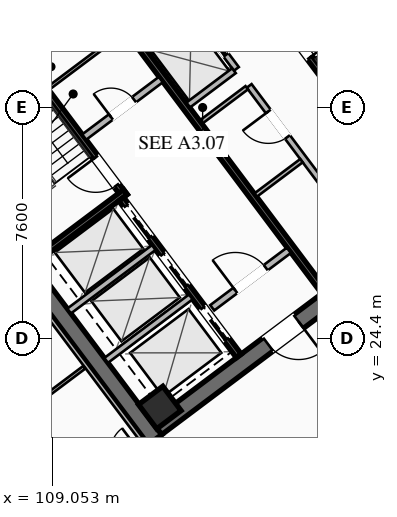
"""IFC4 building model, lengths in metres.
Left out: names, types, materials, properties, quantities, classifications, styles, units other than length and angle.
Written with IfcOpenShell. Run it as: python <this file> out.ifc"""

import sys

from ifc_helpers import new_model, si_unit, direction, frame, frame_2d, origin, origin_2d, place, context, subcontext, project, spatial, rectangle, hollow_rectangle, extrude, element, fill, save


model = new_model("IFC4")
c1 = context("Model", 3, precision=1e-05, world=origin(), true_north=direction((0.0, 1.0)))
c2 = subcontext(c1, "Body", "Model", "MODEL_VIEW")
j1 = project(units=[si_unit("LENGTHUNIT", "METRE"), si_unit("PLANEANGLEUNIT", "RADIAN")], contexts=[c1])
p1 = place(None, origin())
s1 = spatial("IfcSite", under=j1, at=p1, CompositionType="ELEMENT")
p2 = place(p1, origin())
s2 = spatial("IfcBuilding", under=s1, at=p2, CompositionType="ELEMENT")
p3 = place(p2, frame((0.0, 0.0, 114.4)))
s3 = spatial("IfcBuildingStorey", under=s2, at=p3, CompositionType="ELEMENT", Elevation=114.4)
for number, where, z_axis, x_axis in (
    (1, (112.436, 21.077, 0.0), (0.0, 0.0, 1.0), (-0.6, 0.8, 0.0)),
    (2, (115.564, 42.923, 0.0), (0.0, 0.0, 1.0), (0.6, -0.8, 0.0)),
):
    element("IfcWall", number, at=place(p3, frame(where, z_axis=z_axis, x_axis=x_axis)), inside=s3, PredefinedType="SHEAR", context=c2, shape_type="SweptSolid", body=[
        extrude(rectangle(XDim=15.6, YDim=0.55, at=frame_2d((7.8, 0.0))), origin(), (0.0, 0.0, 1.0), 3.55),
    ])
p4 = place(p3, frame((124.539, 30.498, 0.0), z_axis=(0.0, 0.0, 1.0), x_axis=(-0.799998054672, -0.600002593761, 0.0)))
e3 = element("IfcWall", 3, at=p4, inside=s3, PredefinedType="SHEAR", context=c2, shape_type="SweptSolid", body=[
    extrude(rectangle(XDim=15.06, YDim=0.55, at=frame_2d((7.53, 0.0))), origin(), (0.0, 0.0, 1.0), 3.55),
])
p5 = place(p4, frame((9.23, 0.0, 0.0)))
e4 = element("IfcOpeningElement", 4, at=p5, cuts=e3, PredefinedType="OPENING", context=c2, shape_type="SweptSolid", body=[
    extrude(rectangle(XDim=1.25, YDim=2.25, at=frame_2d((0.625, 1.125))), frame((0.0, 0.285, 0.0), z_axis=(0.0, -1.0, 0.0), x_axis=(1.0, 0.0, 0.0)), (0.0, 0.0, 1.0), 0.57),
])
p6 = place(p4, frame((4.18, 0.0, 0.0)))
e5 = element("IfcOpeningElement", 5, at=p6, cuts=e3, PredefinedType="OPENING", context=c2, shape_type="SweptSolid", body=[
    extrude(rectangle(XDim=1.25, YDim=2.25, at=frame_2d((0.625, 1.125))), frame((0.0, 0.285, 0.0), z_axis=(0.0, -1.0, 0.0), x_axis=(1.0, 0.0, 0.0)), (0.0, 0.0, 1.0), 0.57),
])
p7 = place(p3, frame((103.461, 33.502, 0.0), z_axis=(0.0, 0.0, 1.0), x_axis=(0.799998054672, 0.600002593761, 0.0)))
e6 = element("IfcWall", 6, at=p7, inside=s3, PredefinedType="SHEAR", context=c2, shape_type="SweptSolid", body=[
    extrude(rectangle(XDim=15.06, YDim=0.55, at=frame_2d((7.53, 0.0))), origin(), (0.0, 0.0, 1.0), 3.55),
])
p8 = place(p7, frame((4.58, 0.0, 0.0)))
e7 = element("IfcOpeningElement", 7, at=p8, cuts=e6, PredefinedType="OPENING", context=c2, shape_type="SweptSolid", body=[
    extrude(rectangle(XDim=1.25, YDim=2.25, at=frame_2d((0.625, 1.125))), frame((0.0, 0.285, 0.0), z_axis=(0.0, -1.0, 0.0), x_axis=(1.0, 0.0, 0.0)), (0.0, 0.0, 1.0), 0.57),
])
p9 = place(p7, frame((9.63, 0.0, 0.0)))
e8 = element("IfcOpeningElement", 8, at=p9, cuts=e6, PredefinedType="OPENING", context=c2, shape_type="SweptSolid", body=[
    extrude(rectangle(XDim=1.25, YDim=2.25, at=frame_2d((0.625, 1.125))), frame((0.0, 0.285, 0.0), z_axis=(0.0, -1.0, 0.0), x_axis=(1.0, 0.0, 0.0)), (0.0, 0.0, 1.0), 0.57),
])
p10 = place(p3, frame((112.59, 22.13, 0.0), z_axis=(0.0, 0.0, 1.0), x_axis=(0.799999996291, 0.600000004945, 0.0)))
e9 = element("IfcColumn", 9, at=p10, inside=s3, PredefinedType="COLUMN", context=c2, shape_type="SweptSolid", body=[
    extrude(hollow_rectangle(XDim=1.0, YDim=1.0, WallThickness=0.04, at=origin_2d()), origin(), (0.0, 0.0, 1.0), 3.37),
])
p11 = place(p3, frame((111.44, 29.08, 0.0), z_axis=(0.0, 0.0, 1.0), x_axis=(-0.59999029481, 0.8000072788, 0.0)))
e10 = element("IfcWall", 10, at=p11, inside=s3, PredefinedType="SHEAR", context=c2, shape_type="SweptSolid", body=[
    extrude(rectangle(XDim=8.05, YDim=0.2, at=frame_2d((4.025, 0.0))), origin(), (0.0, 0.0, 1.0), 3.37),
])
p12 = place(p11, frame((0.45, 0.0, 0.0)))
e11 = element("IfcOpeningElement", 11, at=p12, cuts=e10, PredefinedType="OPENING", context=c2, shape_type="SweptSolid", body=[
    extrude(rectangle(XDim=1.15, YDim=2.2, at=frame_2d((0.575, 1.1))), frame((0.0, 0.11, 0.0), z_axis=(0.0, -1.0, 0.0), x_axis=(1.0, 0.0, 0.0)), (0.0, 0.0, 1.0), 0.22),
])
p13 = place(p3, frame((108.396, 26.922, 0.0), z_axis=(0.0, 0.0, 1.0), x_axis=(0.800015298837, 0.599979601008, 0.0)))
e12 = element("IfcWall", 12, at=p13, inside=s3, PredefinedType="SHEAR", context=c2, shape_type="SweptSolid", body=[
    extrude(rectangle(XDim=3.83, YDim=0.2, at=frame_2d((1.915, 0.0))), origin(), (0.0, 0.0, 1.0), 3.37),
])
p14 = place(p3, frame((116.56, 34.92, 0.0), z_axis=(0.0, 0.0, 1.0), x_axis=(0.59999029481, -0.8000072788, 0.0)))
e13 = element("IfcWall", 13, at=p14, inside=s3, PredefinedType="SHEAR", context=c2, shape_type="SweptSolid", body=[
    extrude(rectangle(XDim=8.05, YDim=0.2, at=frame_2d((4.025, 0.0))), origin(), (0.0, 0.0, 1.0), 3.37),
])
p15 = place(p14, frame((0.45, 0.0, 0.0)))
e14 = element("IfcOpeningElement", 14, at=p15, cuts=e13, PredefinedType="OPENING", context=c2, shape_type="SweptSolid", body=[
    extrude(rectangle(XDim=1.15, YDim=2.2, at=frame_2d((0.575, 1.1))), frame((0.0, 0.11, 0.0), z_axis=(0.0, -1.0, 0.0), x_axis=(1.0, 0.0, 0.0)), (0.0, 0.0, 1.0), 0.22),
])
p16 = place(p3, frame((117.998, 25.936, 0.0), z_axis=(0.0, 0.0, 1.0), x_axis=(-0.600002693989, 0.799997979501, 0.0)))
e15 = element("IfcWall", 15, at=p16, inside=s3, PredefinedType="SHEAR", context=c2, shape_type="SweptSolid", body=[
    extrude(rectangle(XDim=14.5, YDim=0.2, at=frame_2d((7.25, 0.0))), origin(), (0.0, 0.0, 1.0), 3.37),
])
p17 = place(p3, frame((110.104, 31.028, 0.0), z_axis=(0.0, 0.0, 1.0), x_axis=(0.800018601094, 0.59997519774, 0.0)))
e16 = element("IfcWall", 16, at=p17, inside=s3, PredefinedType="SOLIDWALL", context=c2, shape_type="SweptSolid", body=[
    extrude(rectangle(XDim=3.15, YDim=0.22, at=frame_2d((1.575, 0.0))), origin(), (0.0, 0.0, 1.0), 2.723),
])
p18 = place(p17, frame((1.1, 0.0, 0.0)))
e17 = element("IfcOpeningElement", 17, at=p18, cuts=e16, PredefinedType="OPENING", context=c2, shape_type="SweptSolid", body=[
    extrude(rectangle(XDim=0.95, YDim=2.05, at=frame_2d((0.475, 1.025))), frame((0.0, 0.12, 0.0), z_axis=(0.0, -1.0, 0.0), x_axis=(1.0, 0.0, 0.0)), (0.0, 0.0, 1.0), 0.24),
])
p19 = place(p3, frame((114.316, 25.412, 0.0), z_axis=(0.0, 0.0, 1.0), x_axis=(0.800018601094, 0.59997519774, 0.0)))
e18 = element("IfcWall", 18, at=p19, inside=s3, PredefinedType="SOLIDWALL", context=c2, shape_type="SweptSolid", body=[
    extrude(rectangle(XDim=3.15, YDim=0.22, at=frame_2d((1.575, 0.0))), origin(), (0.0, 0.0, 1.0), 2.723),
])
p20 = place(p19, frame((0.95, 0.0, 0.0)))
e19 = element("IfcOpeningElement", 19, at=p20, cuts=e18, PredefinedType="OPENING", context=c2, shape_type="SweptSolid", body=[
    extrude(rectangle(XDim=1.25, YDim=2.25, at=frame_2d((0.625, 1.125))), frame((0.0, 0.12, 0.0), z_axis=(0.0, -1.0, 0.0), x_axis=(1.0, 0.0, 0.0)), (0.0, 0.0, 1.0), 0.24),
])
p21 = place(p3, frame((115.19, 23.83, 0.0), z_axis=(0.0, 0.0, 1.0), x_axis=(-0.599993943644, 0.800004542231, 0.0)))
e20 = element("IfcWall", 20, at=p21, inside=s3, PredefinedType="SHEAR", context=c2, shape_type="SweptSolid", body=[
    extrude(rectangle(XDim=6.45, YDim=0.2, at=frame_2d((3.225, 0.0))), origin(), (0.0, 0.0, 1.0), 3.37),
])
p22 = place(p21, frame((4.875, 0.0, 0.0)))
e21 = element("IfcOpeningElement", 21, at=p22, cuts=e20, PredefinedType="OPENING", context=c2, shape_type="SweptSolid", body=[
    extrude(rectangle(XDim=1.3, YDim=2.25, at=frame_2d((0.65, 1.125))), frame((0.0, 0.11, 0.0), z_axis=(0.0, -1.0, 0.0), x_axis=(1.0, 0.0, 0.0)), (0.0, 0.0, 1.0), 0.22),
])
p23 = place(p21, frame((2.875, 0.0, 0.0)))
e22 = element("IfcOpeningElement", 22, at=p23, cuts=e20, PredefinedType="OPENING", context=c2, shape_type="SweptSolid", body=[
    extrude(rectangle(XDim=1.3, YDim=2.25, at=frame_2d((0.65, 1.125))), frame((0.0, 0.11, 0.0), z_axis=(0.0, -1.0, 0.0), x_axis=(1.0, 0.0, 0.0)), (0.0, 0.0, 1.0), 0.22),
])
p24 = place(p21, frame((0.675, 0.0, 0.0)))
e23 = element("IfcOpeningElement", 23, at=p24, cuts=e20, PredefinedType="OPENING", context=c2, shape_type="SweptSolid", body=[
    extrude(rectangle(XDim=1.3, YDim=2.25, at=frame_2d((0.65, 1.125))), frame((0.0, 0.11, 0.0), z_axis=(0.0, -1.0, 0.0), x_axis=(1.0, 0.0, 0.0)), (0.0, 0.0, 1.0), 0.22),
])
for number, where, z_axis, x_axis in (
    (24, (110.826, 23.682, 0.0), (0.0, 0.0, 1.0), (0.8, 0.6, 0.0)),
    (25, (109.608, 25.306, 0.0), (0.0, 0.0, 1.0), (0.8, 0.6, 0.0)),
):
    element("IfcWall", number, at=place(p3, frame(where, z_axis=z_axis, x_axis=x_axis)), inside=s3, PredefinedType="SOLIDWALL", context=c2, shape_type="SweptSolid", body=[
        extrude(rectangle(XDim=3.48, YDim=0.2, at=frame_2d((1.74, 0.0))), origin(), (0.0, 0.0, 1.0), 3.37),
    ])
p25 = place(p3, frame((108.91, 32.62, 0.0), z_axis=(0.0, 0.0, 1.0), x_axis=(0.800018601094, 0.59997519774, 0.0)))
e26 = element("IfcWall", 26, at=p25, inside=s3, PredefinedType="PARTITIONING", context=c2, shape_type="SweptSolid", body=[
    extrude(rectangle(XDim=3.15, YDim=0.11, at=frame_2d((1.575, 0.0))), origin(), (0.0, 0.0, 1.0), 2.723),
])
p26 = place(p3, frame((119.67, 27.19, 0.0), z_axis=(0.0, 0.0, 1.0), x_axis=(-0.599988677396, 0.800008491828, 0.0)))
e27 = element("IfcWall", 27, at=p26, inside=s3, PredefinedType="SOLIDWALL", context=c2, shape_type="SweptSolid", body=[
    extrude(rectangle(XDim=6.9, YDim=0.2, at=frame_2d((3.45, 0.0))), origin(), (0.0, 0.0, 1.0), 2.723),
])
p27 = place(p26, frame((0.85, 0.0, 0.0)))
e28 = element("IfcOpeningElement", 28, at=p27, cuts=e27, PredefinedType="OPENING", context=c2, shape_type="SweptSolid", body=[
    extrude(rectangle(XDim=0.95, YDim=2.05, at=frame_2d((0.475, 1.025))), frame((0.0, 0.11, 0.0), z_axis=(0.0, -1.0, 0.0), x_axis=(1.0, 0.0, 0.0)), (0.0, 0.0, 1.0), 0.22),
])
p28 = place(p26, frame((4.8, 0.0, 0.0)))
e29 = element("IfcOpeningElement", 29, at=p28, cuts=e27, PredefinedType="OPENING", context=c2, shape_type="SweptSolid", body=[
    extrude(rectangle(XDim=1.05, YDim=2.2, at=frame_2d((0.525, 1.1))), frame((0.0, 0.11, 0.0), z_axis=(0.0, -1.0, 0.0), x_axis=(1.0, 0.0, 0.0)), (0.0, 0.0, 1.0), 0.22),
])
for number, where, z_axis, x_axis in (
    (30, (113.946, 31.522, 0.0), (0.0, 0.0, 1.0), (0.8, 0.6, 0.0)),
    (31, (115.746, 29.122, 0.0), (0.0, 0.0, 1.0), (0.8, 0.6, 0.0)),
):
    element("IfcWall", number, at=place(p3, frame(where, z_axis=z_axis, x_axis=x_axis)), inside=s3, PredefinedType="PARTITIONING", context=c2, shape_type="SweptSolid", body=[
        extrude(rectangle(XDim=1.88, YDim=0.135, at=frame_2d((0.94, 0.0))), origin(), (0.0, 0.0, 1.0), 2.723),
    ])
p29 = place(p3, frame((115.11, 33.27, 0.0), z_axis=(0.0, 0.0, 1.0), x_axis=(-0.600011322243, 0.799991508192, 0.0)))
e32 = element("IfcWall", 32, at=p29, inside=s3, PredefinedType="SOLIDWALL", context=c2, shape_type="SweptSolid", body=[
    extrude(rectangle(XDim=6.9, YDim=0.2, at=frame_2d((3.45, 0.0))), origin(), (0.0, 0.0, 1.0), 3.37),
])
p30 = place(p29, frame((0.575, 0.0, 0.0)))
e33 = element("IfcOpeningElement", 33, at=p30, cuts=e32, PredefinedType="OPENING", context=c2, shape_type="SweptSolid", body=[
    extrude(rectangle(XDim=1.1, YDim=2.2, at=frame_2d((0.55, 1.1))), frame((0.0, 0.11, 0.0), z_axis=(0.0, -1.0, 0.0), x_axis=(1.0, 0.0, 0.0)), (0.0, 0.0, 1.0), 0.22),
])
p31 = place(p29, frame((2.825, 0.0, 0.0)))
e34 = element("IfcOpeningElement", 34, at=p31, cuts=e32, PredefinedType="OPENING", context=c2, shape_type="SweptSolid", body=[
    extrude(rectangle(XDim=1.1, YDim=2.2, at=frame_2d((0.55, 1.1))), frame((0.0, 0.11, 0.0), z_axis=(0.0, -1.0, 0.0), x_axis=(1.0, 0.0, 0.0)), (0.0, 0.0, 1.0), 0.22),
])
p32 = place(p29, frame((5.075, 0.0, 0.0)))
e35 = element("IfcOpeningElement", 35, at=p32, cuts=e32, PredefinedType="OPENING", context=c2, shape_type="SweptSolid", body=[
    extrude(rectangle(XDim=1.1, YDim=2.2, at=frame_2d((0.55, 1.1))), frame((0.0, 0.11, 0.0), z_axis=(0.0, -1.0, 0.0), x_axis=(1.0, 0.0, 0.0)), (0.0, 0.0, 1.0), 0.22),
])
p33 = place(p3, frame((113.526, 32.082, 0.0), z_axis=(0.0, 0.0, 1.0), x_axis=(0.800046745961, 0.599937666993, 0.0)))
e36 = element("IfcWall", 36, at=p33, inside=s3, PredefinedType="SOLIDWALL", context=c2, shape_type="SweptSolid", body=[
    extrude(rectangle(XDim=1.88, YDim=0.2, at=frame_2d((0.94, 0.0))), origin(), (0.0, 0.0, 1.0), 3.37),
])
p34 = place(p3, frame((112.176, 33.882, 0.0), z_axis=(0.0, 0.0, 1.0), x_axis=(0.8, 0.6, 0.0)))
e37 = element("IfcWall", 37, at=p34, inside=s3, PredefinedType="SOLIDWALL", context=c2, shape_type="SweptSolid", body=[
    extrude(rectangle(XDim=1.88, YDim=0.2, at=frame_2d((0.94, 0.0))), origin(), (0.0, 0.0, 1.0), 3.37),
])
p35 = place(p3, frame((95.87, 30.09, 0.0), z_axis=(0.0, 0.0, 1.0), x_axis=(0.799997191971, 0.600003744021, 0.0)))
e38 = element("IfcWall", 38, at=p35, inside=s3, PredefinedType="PARTITIONING", context=c2, shape_type="SweptSolid", body=[
    extrude(rectangle(XDim=31.3, YDim=0.135, at=frame_2d((15.65, 0.0))), origin(), (0.0, 0.0, 1.0), 2.723),
])
p36 = place(p35, frame((0.3, 0.0, 0.0)))
e39 = element("IfcOpeningElement", 39, at=p36, cuts=e38, PredefinedType="OPENING", context=c2, shape_type="SweptSolid", body=[
    extrude(rectangle(XDim=0.95, YDim=2.05, at=frame_2d((0.475, 1.025))), frame((0.0, 0.077, 0.0), z_axis=(0.0, -1.0, 0.0), x_axis=(1.0, 0.0, 0.0)), (0.0, 0.0, 1.0), 0.155),
])
p37 = place(p35, frame((30.05, 0.0, 0.0)))
e40 = element("IfcOpeningElement", 40, at=p37, cuts=e38, PredefinedType="OPENING", context=c2, shape_type="SweptSolid", body=[
    extrude(rectangle(XDim=0.95, YDim=2.05, at=frame_2d((0.475, 1.025))), frame((0.0, 0.077, 0.0), z_axis=(0.0, -1.0, 0.0), x_axis=(1.0, 0.0, 0.0)), (0.0, 0.0, 1.0), 0.155),
])
p38 = place(p3, frame((133.282, 32.374, 0.0), z_axis=(0.0, 0.0, 1.0), x_axis=(-0.8, -0.6, 0.0)))
e41 = element("IfcWall", 41, at=p38, inside=s3, PredefinedType="PARTITIONING", context=c2, shape_type="SweptSolid", body=[
    extrude(rectangle(XDim=31.3, YDim=0.135, at=frame_2d((15.65, 0.0))), origin(), (0.0, 0.0, 1.0), 2.723),
])
p39 = place(p38, frame((29.97, 0.0, 0.0)))
e42 = element("IfcOpeningElement", 42, at=p39, cuts=e41, PredefinedType="OPENING", context=c2, shape_type="SweptSolid", body=[
    extrude(rectangle(XDim=0.95, YDim=2.05, at=frame_2d((0.475, 1.025))), frame((0.0, 0.077, 0.0), z_axis=(0.0, -1.0, 0.0), x_axis=(1.0, 0.0, 0.0)), (0.0, 0.0, 1.0), 0.155),
])
p40 = place(p38, frame((19.151, 0.0, 0.0)))
e43 = element("IfcOpeningElement", 43, at=p40, cuts=e41, PredefinedType="OPENING", context=c2, shape_type="SweptSolid", body=[
    extrude(rectangle(XDim=0.95, YDim=2.05, at=frame_2d((0.475, 1.025))), frame((0.0, 0.077, 0.0), z_axis=(0.0, -1.0, 0.0), x_axis=(1.0, 0.0, 0.0)), (0.0, 0.0, 1.0), 0.155),
])
p41 = place(p38, frame((14.901, 0.0, 0.0)))
e44 = element("IfcOpeningElement", 44, at=p41, cuts=e41, PredefinedType="OPENING", context=c2, shape_type="SweptSolid", body=[
    extrude(rectangle(XDim=0.95, YDim=2.05, at=frame_2d((0.475, 1.025))), frame((0.0, 0.077, 0.0), z_axis=(0.0, -1.0, 0.0), x_axis=(1.0, 0.0, 0.0)), (0.0, 0.0, 1.0), 0.155),
])
p42 = place(p38, frame((10.92, 0.0, 0.0)))
e45 = element("IfcOpeningElement", 45, at=p42, cuts=e41, PredefinedType="OPENING", context=c2, shape_type="SweptSolid", body=[
    extrude(rectangle(XDim=0.95, YDim=2.05, at=frame_2d((0.475, 1.025))), frame((0.0, 0.077, 0.0), z_axis=(0.0, -1.0, 0.0), x_axis=(1.0, 0.0, 0.0)), (0.0, 0.0, 1.0), 0.155),
])
p43 = place(p38, frame((0.38, 0.0, 0.0)))
e46 = element("IfcOpeningElement", 46, at=p43, cuts=e41, PredefinedType="OPENING", context=c2, shape_type="SweptSolid", body=[
    extrude(rectangle(XDim=0.95, YDim=2.05, at=frame_2d((0.475, 1.025))), frame((0.0, 0.077, 0.0), z_axis=(0.0, -1.0, 0.0), x_axis=(1.0, 0.0, 0.0)), (0.0, 0.0, 1.0), 0.155),
])
p44 = place(p3, frame((112.104, 20.928, 0.0), z_axis=(0.0, 0.0, 1.0), x_axis=(-0.599994940075, 0.800003794918, 0.0)))
e47 = element("IfcWall", 47, at=p44, inside=s3, PredefinedType="PARTITIONING", context=c2, shape_type="SweptSolid", body=[
    extrude(rectangle(XDim=15.44, YDim=0.135, at=frame_2d((7.72, 0.0))), origin(), (0.0, 0.0, 1.0), 2.723),
])
p45 = place(p3, frame((102.076, 17.432, 0.0), z_axis=(0.0, 0.0, 1.0), x_axis=(0.799991245945, 0.600011671896, 0.0)))
e48 = element("IfcWall", 48, at=p45, inside=s3, PredefinedType="PARTITIONING", context=c2, shape_type="SweptSolid", body=[
    extrude(rectangle(XDim=10.04, YDim=0.11, at=frame_2d((5.02, 0.0))), origin(), (0.0, 0.0, 1.0), 2.723),
])
p46 = place(p5, origin())
e49 = element("IfcDoor", 49, at=p46, inside=s3, OperationType="SINGLE_SWING_LEFT", PredefinedType="DOOR", context=c2, shape_type="SweptSolid", body=[
    extrude(rectangle(XDim=1.25, YDim=2.25, at=frame_2d((0.625, 1.125))), frame((0.0, 0.025, 0.0), z_axis=(0.0, -1.0, 0.0), x_axis=(1.0, 0.0, 0.0)), (0.0, 0.0, 1.0), 0.05),
])
fill(e4, e49)
p47 = place(p12, origin())
e50 = element("IfcDoor", 50, at=p47, inside=s3, OperationType="SINGLE_SWING_RIGHT", PredefinedType="DOOR", context=c2, shape_type="SweptSolid", body=[
    extrude(rectangle(XDim=1.15, YDim=2.2, at=frame_2d((0.575, 1.1))), frame((0.0, 0.025, 0.0), z_axis=(0.0, -1.0, 0.0), x_axis=(1.0, 0.0, 0.0)), (0.0, 0.0, 1.0), 0.05),
])
fill(e11, e50)
p48 = place(p15, origin())
e51 = element("IfcDoor", 51, at=p48, inside=s3, OperationType="SINGLE_SWING_RIGHT", PredefinedType="DOOR", context=c2, shape_type="SweptSolid", body=[
    extrude(rectangle(XDim=1.15, YDim=2.2, at=frame_2d((0.575, 1.1))), frame((0.0, 0.025, 0.0), z_axis=(0.0, -1.0, 0.0), x_axis=(1.0, 0.0, 0.0)), (0.0, 0.0, 1.0), 0.05),
])
fill(e14, e51)
p49 = place(p20, origin())
e52 = element("IfcDoor", 52, at=p49, inside=s3, OperationType="SINGLE_SWING_LEFT", PredefinedType="DOOR", context=c2, shape_type="SweptSolid", body=[
    extrude(rectangle(XDim=1.25, YDim=2.25, at=frame_2d((0.625, 1.125))), frame((0.0, 0.025, 0.0), z_axis=(0.0, -1.0, 0.0), x_axis=(1.0, 0.0, 0.0)), (0.0, 0.0, 1.0), 0.05),
])
fill(e19, e52)
p50 = place(p18, origin())
e53 = element("IfcDoor", 53, at=p50, inside=s3, OperationType="SINGLE_SWING_LEFT", PredefinedType="DOOR", context=c2, shape_type="SweptSolid", body=[
    extrude(rectangle(XDim=0.95, YDim=2.05, at=frame_2d((0.475, 1.025))), frame((0.0, 0.025, 0.0), z_axis=(0.0, -1.0, 0.0), x_axis=(1.0, 0.0, 0.0)), (0.0, 0.0, 1.0), 0.05),
])
fill(e17, e53)
p51 = place(p28, origin())
e54 = element("IfcDoor", 54, at=p51, inside=s3, OperationType="SINGLE_SWING_RIGHT", PredefinedType="DOOR", context=c2, shape_type="SweptSolid", body=[
    extrude(rectangle(XDim=1.05, YDim=2.2, at=frame_2d((0.525, 1.1))), frame((0.0, 0.025, 0.0), z_axis=(0.0, -1.0, 0.0), x_axis=(1.0, 0.0, 0.0)), (0.0, 0.0, 1.0), 0.05),
])
fill(e29, e54)
p52 = place(p22, origin())
e55 = element("IfcDoor", 55, at=p52, inside=s3, OperationType="SLIDING_TO_LEFT", PredefinedType="DOOR", context=c2, shape_type="SweptSolid", body=[
    extrude(rectangle(XDim=1.3, YDim=2.25, at=frame_2d((0.65, 1.125))), frame((0.0, 0.025, 0.0), z_axis=(0.0, -1.0, 0.0), x_axis=(1.0, 0.0, 0.0)), (0.0, 0.0, 1.0), 0.05),
])
fill(e21, e55)
p53 = place(p23, origin())
e56 = element("IfcDoor", 56, at=p53, inside=s3, OperationType="SLIDING_TO_LEFT", PredefinedType="DOOR", context=c2, shape_type="SweptSolid", body=[
    extrude(rectangle(XDim=1.3, YDim=2.25, at=frame_2d((0.65, 1.125))), frame((0.0, 0.025, 0.0), z_axis=(0.0, -1.0, 0.0), x_axis=(1.0, 0.0, 0.0)), (0.0, 0.0, 1.0), 0.05),
])
fill(e22, e56)
p54 = place(p24, origin())
e57 = element("IfcDoor", 57, at=p54, inside=s3, OperationType="SLIDING_TO_LEFT", PredefinedType="DOOR", context=c2, shape_type="SweptSolid", body=[
    extrude(rectangle(XDim=1.3, YDim=2.25, at=frame_2d((0.65, 1.125))), frame((0.0, 0.025, 0.0), z_axis=(0.0, -1.0, 0.0), x_axis=(1.0, 0.0, 0.0)), (0.0, 0.0, 1.0), 0.05),
])
fill(e23, e57)
p55 = place(p30, origin())
e58 = element("IfcDoor", 58, at=p55, inside=s3, OperationType="SLIDING_TO_LEFT", PredefinedType="DOOR", context=c2, shape_type="SweptSolid", body=[
    extrude(rectangle(XDim=1.1, YDim=2.2, at=frame_2d((0.55, 1.1))), frame((0.0, 0.025, 0.0), z_axis=(0.0, -1.0, 0.0), x_axis=(1.0, 0.0, 0.0)), (0.0, 0.0, 1.0), 0.05),
])
fill(e33, e58)
save(model, sys.argv[1])
